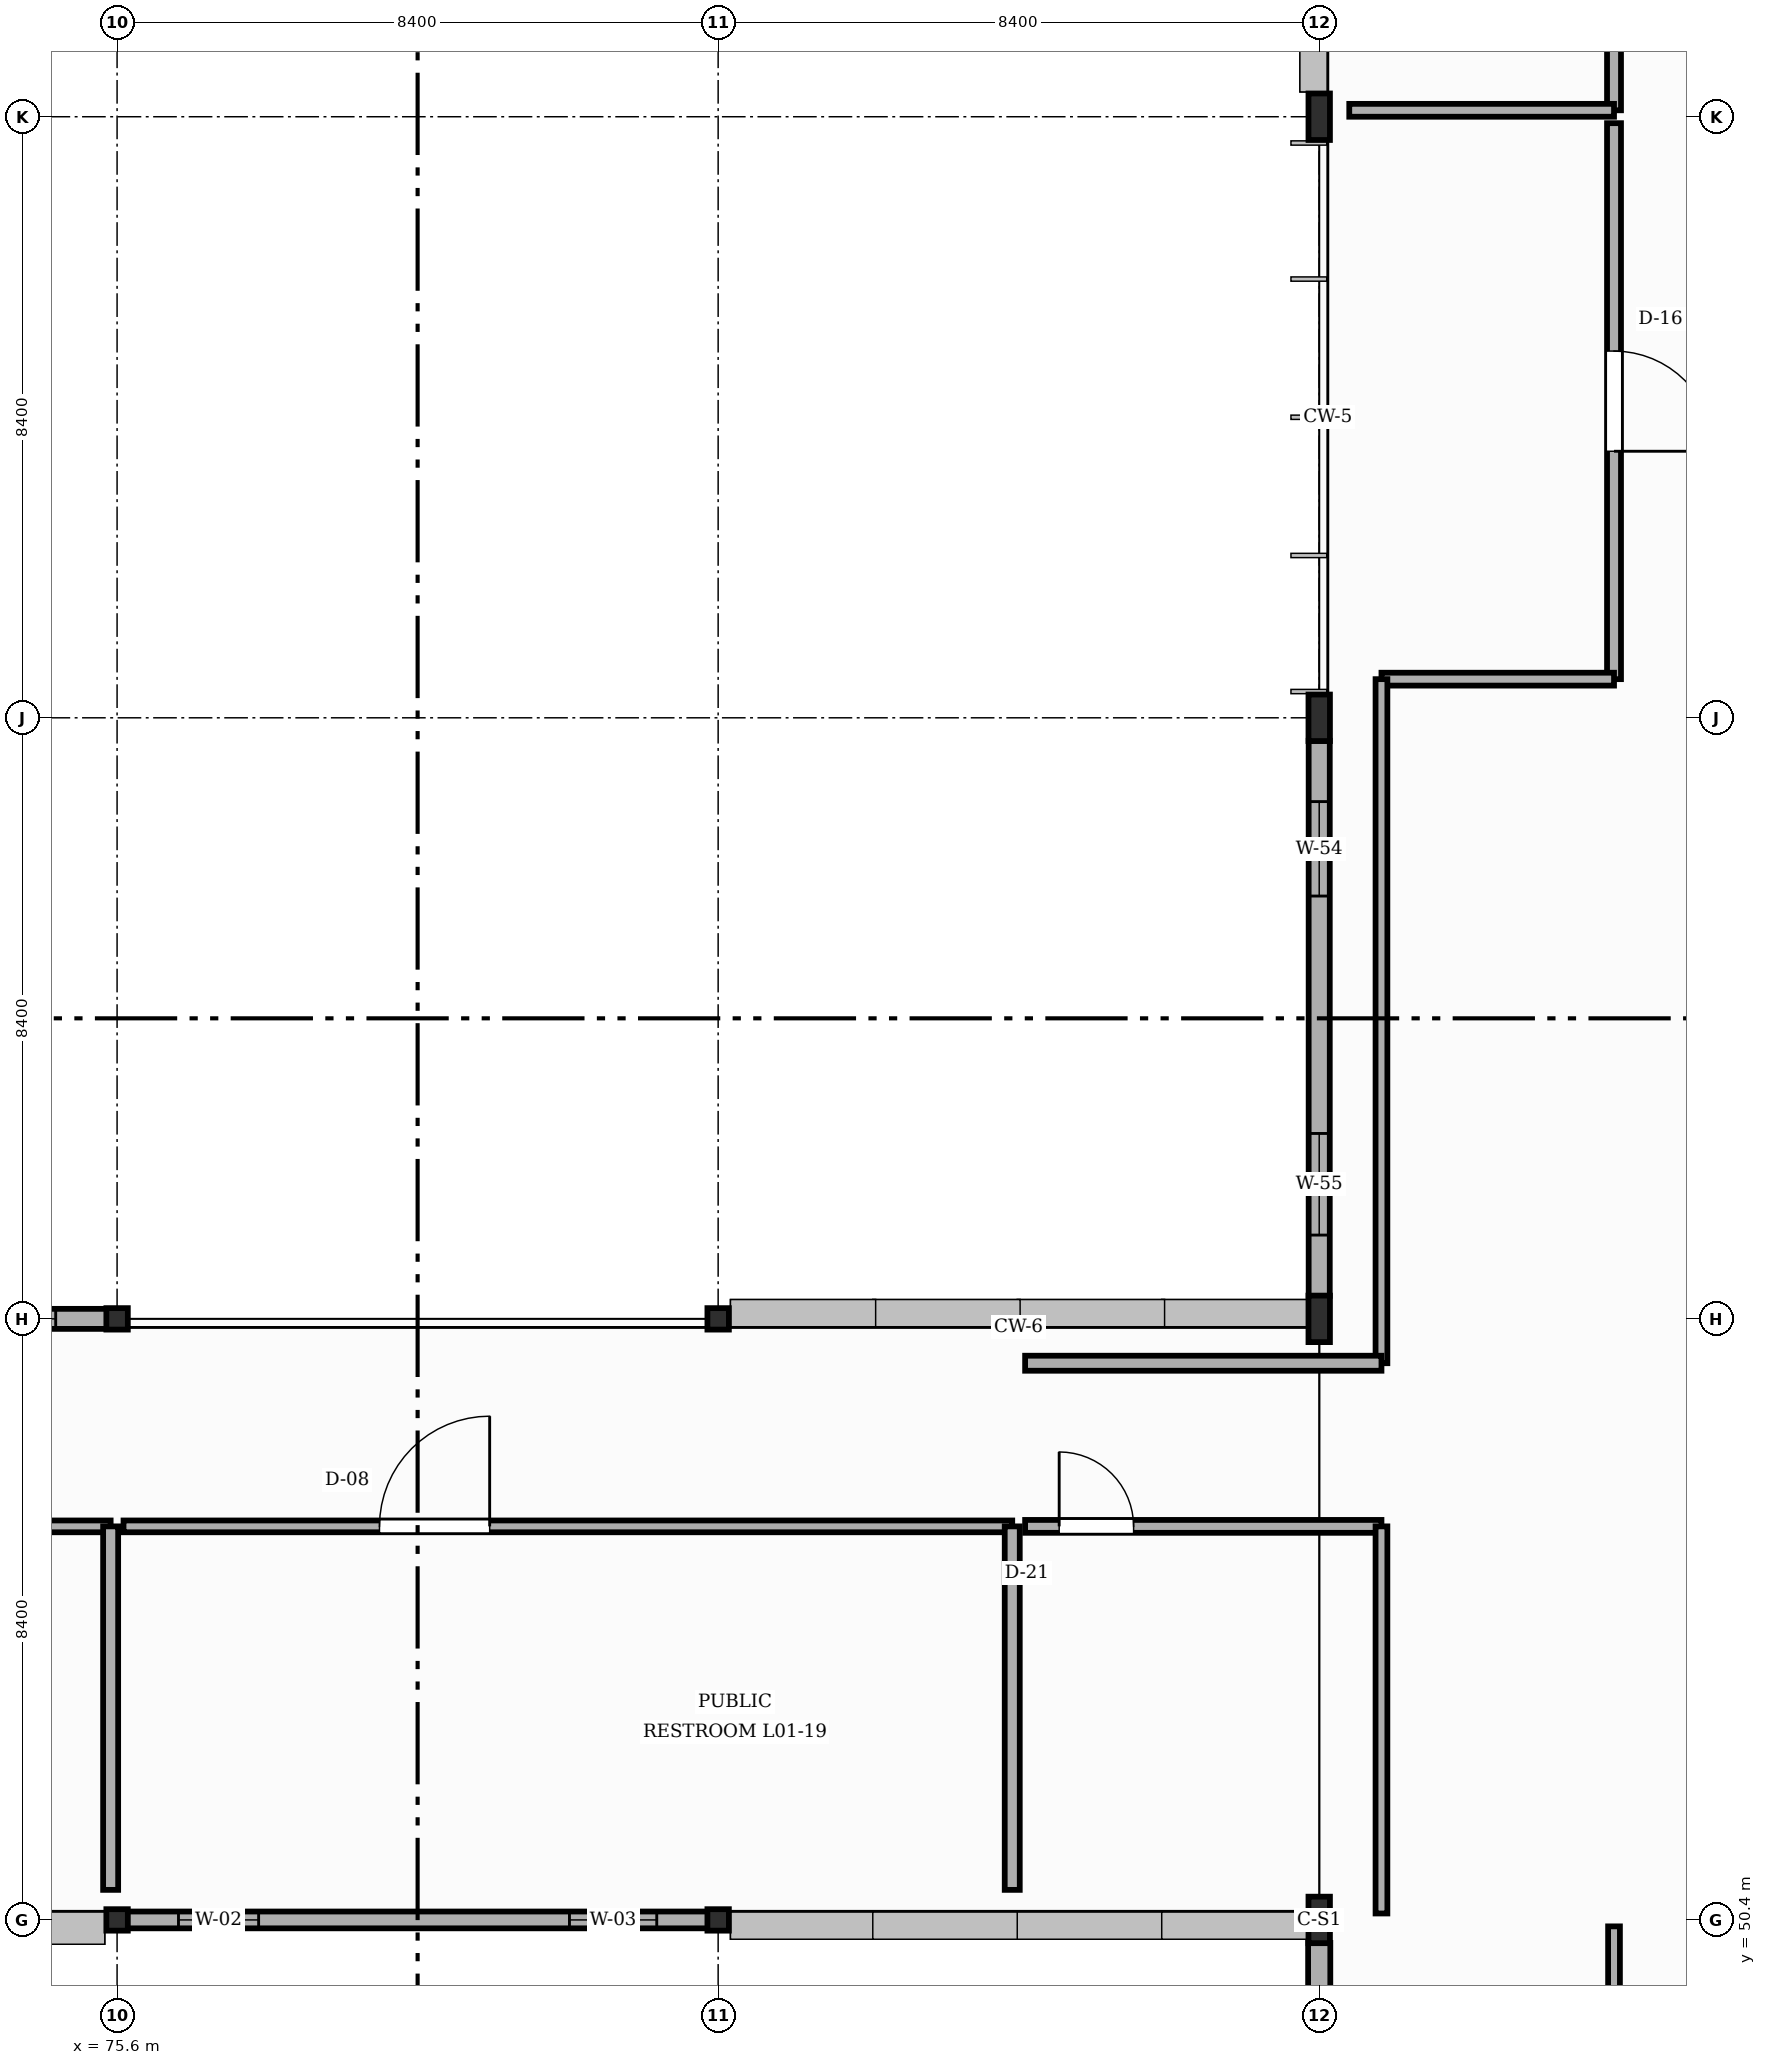
"""IFC4 building model, lengths in metres.
Left out: names, types, materials, properties, quantities, classifications, styles, units other than length and angle.
Written with IfcOpenShell. Run it as: python <this file> out.ifc"""

import sys

from ifc_helpers import new_model, si_unit, direction, frame, frame_2d, origin, origin_2d, place, context, subcontext, project, spatial, rectangle, i_section, extrude, element, fill, save


model = new_model("IFC4")
c1 = context("Model", 3, precision=1e-05, world=origin(), true_north=direction((0.0, 1.0)))
c2 = subcontext(c1, "Body", "Model", "MODEL_VIEW")
j1 = project(units=[si_unit("LENGTHUNIT", "METRE"), si_unit("PLANEANGLEUNIT", "RADIAN")], contexts=[c1])
p1 = place(None, origin())
s1 = spatial("IfcSite", under=j1, at=p1, CompositionType="ELEMENT")
p2 = place(p1, origin())
s2 = spatial("IfcBuilding", under=s1, at=p2, CompositionType="ELEMENT")
p3 = place(p2, frame((0.0, 0.0, 5.4)))
s3 = spatial("IfcBuildingStorey", under=s2, at=p3, CompositionType="ELEMENT", Elevation=5.4)
for number, where, z_axis, x_axis in (
    (1, (75.6, 50.4, 0.0), (0.0, 0.0, 1.0), (1.0, 0.0, 0.0)),
    (2, (75.6, 58.8, 0.0), (0.0, 0.0, 1.0), (1.0, 0.0, 0.0)),
    (3, (84.0, 50.4, 0.0), (0.0, 0.0, 1.0), (1.0, 0.0, 0.0)),
    (4, (84.0, 58.8, 0.0), (0.0, 0.0, 1.0), (1.0, 0.0, 0.0)),
):
    element("IfcColumn", number, at=place(p3, frame(where, z_axis=z_axis, x_axis=x_axis)), inside=s3, PredefinedType="COLUMN", context=c2, shape_type="SweptSolid", body=[
        extrude(i_section(OverallWidth=0.3, OverallDepth=0.3, WebThickness=0.011, FlangeThickness=0.019, FilletRadius=0.027, at=origin_2d()), origin(), (0.0, 0.0, 1.0), 4.5),
    ])
for number, where, z_axis, x_axis in (
    (5, (92.4, 50.4, 0.0), (0.0, 0.0, 1.0), (1.0, 0.0, 0.0)),
    (6, (92.4, 58.8, 0.0), (0.0, 0.0, 1.0), (1.0, 0.0, 0.0)),
    (7, (92.4, 67.2, 0.0), (0.0, 0.0, 1.0), (1.0, 0.0, 0.0)),
    (8, (92.4, 75.6, 0.0), (0.0, 0.0, 1.0), (1.0, 0.0, 0.0)),
):
    element("IfcColumn", number, at=place(p3, frame(where, z_axis=z_axis, x_axis=x_axis)), inside=s3, PredefinedType="COLUMN", context=c2, shape_type="SweptSolid", body=[
        extrude(i_section(OverallWidth=0.3, OverallDepth=0.65, WebThickness=0.016, FlangeThickness=0.031, FilletRadius=0.027, at=origin_2d()), origin(), (0.0, 0.0, 1.0), 4.5),
    ])
p4 = place(p3, frame((92.4, 66.879, 0.0), z_axis=(0.0, 0.0, 1.0), x_axis=(0.0, -1.0, 0.0)))
e9 = element("IfcWall", 9, at=p4, inside=s3, PredefinedType="STANDARD", context=c2, shape_type="SweptSolid", body=[
    extrude(rectangle(XDim=7.758, YDim=0.295, at=frame_2d((3.879, 0.0))), origin(), (0.0, 0.0, 1.0), 3.922),
])
p5 = place(p4, frame((0.85, 0.0, 0.9)))
e10 = element("IfcOpeningElement", 10, at=p5, cuts=e9, PredefinedType="OPENING", context=c2, shape_type="SweptSolid", body=[
    extrude(rectangle(XDim=1.32, YDim=2.05, at=frame_2d((0.66, 1.025))), frame((0.0, 0.157, 0.0), z_axis=(0.0, -1.0, 0.0), x_axis=(1.0, 0.0, 0.0)), (0.0, 0.0, 1.0), 0.315),
])
p6 = place(p4, frame((5.488, 0.0, 0.9)))
e11 = element("IfcOpeningElement", 11, at=p6, cuts=e9, PredefinedType="OPENING", context=c2, shape_type="SweptSolid", body=[
    extrude(rectangle(XDim=1.42, YDim=2.05, at=frame_2d((0.71, 1.025))), frame((0.0, 0.157, 0.0), z_axis=(0.0, -1.0, 0.0), x_axis=(1.0, 0.0, 0.0)), (0.0, 0.0, 1.0), 0.315),
])
p7 = place(p3, frame((75.592, 58.8, 0.0), z_axis=(0.0, 0.0, 1.0), x_axis=(-1.0, 0.0, 0.0)))
e12 = element("IfcWall", 12, at=p7, inside=s3, PredefinedType="STANDARD", context=c2, shape_type="SweptSolid", body=[
    extrude(rectangle(XDim=8.384, YDim=0.28, at=frame_2d((4.192, 0.0))), origin(), (0.0, 0.0, 1.0), 3.952),
])
p8 = place(p7, frame((0.85, 0.0, 0.9)))
e13 = element("IfcOpeningElement", 13, at=p8, cuts=e12, PredefinedType="OPENING", context=c2, shape_type="SweptSolid", body=[
    extrude(rectangle(XDim=1.52, YDim=2.05, at=frame_2d((0.76, 1.025))), frame((0.0, 0.15, 0.0), z_axis=(0.0, -1.0, 0.0), x_axis=(1.0, 0.0, 0.0)), (0.0, 0.0, 1.0), 0.3),
])
p9 = place(p7, frame((5.914, 0.0, 0.9)))
e14 = element("IfcOpeningElement", 14, at=p9, cuts=e12, PredefinedType="OPENING", context=c2, shape_type="SweptSolid", body=[
    extrude(rectangle(XDim=1.62, YDim=2.05, at=frame_2d((0.81, 1.025))), frame((0.0, 0.15, 0.0), z_axis=(0.0, -1.0, 0.0), x_axis=(1.0, 0.0, 0.0)), (0.0, 0.0, 1.0), 0.3),
])
p10 = place(p3, frame((75.608, 50.4, 0.0), z_axis=(0.0, 0.0, 1.0), x_axis=(1.0, 0.0, 0.0)))
e15 = element("IfcWall", 15, at=p10, inside=s3, PredefinedType="STANDARD", context=c2, shape_type="SweptSolid", body=[
    extrude(rectangle(XDim=8.384, YDim=0.235, at=frame_2d((4.192, 0.0))), origin(), (0.0, 0.0, 1.0), 3.952),
])
p11 = place(p10, frame((0.85, 0.0, 0.9)))
e16 = element("IfcOpeningElement", 16, at=p11, cuts=e15, PredefinedType="OPENING", context=c2, shape_type="SweptSolid", body=[
    extrude(rectangle(XDim=1.12, YDim=1.05, at=frame_2d((0.56, 0.525))), frame((0.0, 0.127, 0.0), z_axis=(0.0, -1.0, 0.0), x_axis=(1.0, 0.0, 0.0)), (0.0, 0.0, 1.0), 0.255),
])
p12 = place(p10, frame((6.314, 0.0, 0.9)))
e17 = element("IfcOpeningElement", 17, at=p12, cuts=e15, PredefinedType="OPENING", context=c2, shape_type="SweptSolid", body=[
    extrude(rectangle(XDim=1.22, YDim=1.05, at=frame_2d((0.61, 0.525))), frame((0.0, 0.127, 0.0), z_axis=(0.0, -1.0, 0.0), x_axis=(1.0, 0.0, 0.0)), (0.0, 0.0, 1.0), 0.255),
])
p13 = place(p3, frame((92.4, 50.079, 0.0), z_axis=(0.0, 0.0, 1.0), x_axis=(0.0, -1.0, 0.0)))
e18 = element("IfcWall", 18, at=p13, inside=s3, PredefinedType="STANDARD", context=c2, shape_type="SweptSolid", body=[
    extrude(rectangle(XDim=7.758, YDim=0.31, at=frame_2d((3.879, 0.0))), origin(), (0.0, 0.0, 1.0), 3.922),
])
p14 = place(p3, frame((96.52, 77.68, -0.004), z_axis=(0.0, 0.0, 1.0), x_axis=(0.0, -1.0, 0.0)))
e19 = element("IfcWall", 19, at=p14, inside=s3, PredefinedType="STANDARD", context=c2, shape_type="SweptSolid", body=[
    extrude(rectangle(XDim=1.99, YDim=0.195, at=frame_2d((0.995, 0.0))), origin(), (0.0, 0.0, 1.0), 4.294),
])
p15 = place(p3, frame((96.52, 75.69, -0.004), z_axis=(0.0, 0.0, 1.0), x_axis=(-1.0, 0.0, 0.0)))
e20 = element("IfcWall", 20, at=p15, inside=s3, PredefinedType="STANDARD", context=c2, shape_type="SweptSolid", body=[
    extrude(rectangle(XDim=3.7, YDim=0.18, at=frame_2d((1.85, 0.0))), origin(), (0.0, 0.0, 1.0), 3.286),
])
p16 = place(p3, frame((63.09, 55.9, -0.004), z_axis=(0.0, 0.0, 1.0), x_axis=(1.0, 0.0, 0.0)))
e21 = element("IfcWall", 21, at=p16, inside=s3, PredefinedType="STANDARD", context=c2, shape_type="SweptSolid", body=[
    extrude(rectangle(XDim=12.42, YDim=0.165, at=frame_2d((6.21, 0.0))), origin(), (0.0, 0.0, 1.0), 4.294),
])
p17 = place(p16, frame((7.433, 0.0, 0.0)))
e22 = element("IfcOpeningElement", 22, at=p17, cuts=e21, PredefinedType="OPENING", context=c2, shape_type="SweptSolid", body=[
    extrude(rectangle(XDim=1.28, YDim=2.06, at=frame_2d((0.64, 1.03))), frame((0.0, 0.093, 0.0), z_axis=(0.0, -1.0, 0.0), x_axis=(1.0, 0.0, 0.0)), (0.0, 0.0, 1.0), 0.185),
])
p18 = place(p3, frame((75.51, 55.9, -0.004), z_axis=(0.0, 0.0, 1.0), x_axis=(0.0, -1.0, 0.0)))
e23 = element("IfcWall", 23, at=p18, inside=s3, PredefinedType="STANDARD", context=c2, shape_type="SweptSolid", body=[
    extrude(rectangle(XDim=5.08, YDim=0.21, at=frame_2d((2.54, 0.0))), origin(), (0.0, 0.0, 1.0), 4.016),
])
p19 = place(p3, frame((75.69, 55.9, -0.004), z_axis=(0.0, 0.0, 1.0), x_axis=(1.0, 0.0, 0.0)))
e24 = element("IfcWall", 24, at=p19, inside=s3, PredefinedType="STANDARD", context=c2, shape_type="SweptSolid", body=[
    extrude(rectangle(XDim=12.42, YDim=0.165, at=frame_2d((6.21, 0.0))), origin(), (0.0, 0.0, 1.0), 4.294),
])
p20 = place(p19, frame((3.577, 0.0, 0.0)))
e25 = element("IfcOpeningElement", 25, at=p20, cuts=e24, PredefinedType="OPENING", context=c2, shape_type="SweptSolid", body=[
    extrude(rectangle(XDim=1.54, YDim=2.06, at=frame_2d((0.77, 1.03))), frame((0.0, 0.093, 0.0), z_axis=(0.0, -1.0, 0.0), x_axis=(1.0, 0.0, 0.0)), (0.0, 0.0, 1.0), 0.185),
])
p21 = place(p3, frame((88.11, 55.9, -0.004), z_axis=(0.0, 0.0, 1.0), x_axis=(0.0, -1.0, 0.0)))
e26 = element("IfcWall", 26, at=p21, inside=s3, PredefinedType="STANDARD", context=c2, shape_type="SweptSolid", body=[
    extrude(rectangle(XDim=5.08, YDim=0.21, at=frame_2d((2.54, 0.0))), origin(), (0.0, 0.0, 1.0), 4.294),
])
p22 = place(p3, frame((96.52, 75.51, -0.004), z_axis=(0.0, 0.0, 1.0), x_axis=(0.0, -1.0, 0.0)))
e27 = element("IfcWall", 27, at=p22, inside=s3, PredefinedType="STANDARD", context=c2, shape_type="SweptSolid", body=[
    extrude(rectangle(XDim=7.77, YDim=0.195, at=frame_2d((3.885, 0.0))), origin(), (0.0, 0.0, 1.0), 4.294),
])
p23 = place(p22, frame((3.185, 0.0, 0.0)))
e28 = element("IfcOpeningElement", 28, at=p23, cuts=e27, PredefinedType="OPENING", context=c2, shape_type="SweptSolid", body=[
    extrude(rectangle(XDim=1.4, YDim=2.14, at=frame_2d((0.7, 1.07))), frame((0.0, 0.107, 0.0), z_axis=(0.0, -1.0, 0.0), x_axis=(1.0, 0.0, 0.0)), (0.0, 0.0, 1.0), 0.215),
])
p24 = place(p3, frame((96.52, 67.74, -0.004), z_axis=(0.0, 0.0, 1.0), x_axis=(-1.0, 0.0, 0.0)))
e29 = element("IfcWall", 29, at=p24, inside=s3, PredefinedType="STANDARD", context=c2, shape_type="SweptSolid", body=[
    extrude(rectangle(XDim=3.25, YDim=0.18, at=frame_2d((1.625, 0.0))), origin(), (0.0, 0.0, 1.0), 3.286),
])
p25 = place(p3, frame((93.27, 67.74, -0.004), z_axis=(0.0, 0.0, 1.0), x_axis=(0.0, -1.0, 0.0)))
e30 = element("IfcWall", 30, at=p25, inside=s3, PredefinedType="STANDARD", context=c2, shape_type="SweptSolid", body=[
    extrude(rectangle(XDim=9.56, YDim=0.165, at=frame_2d((4.78, 0.0))), origin(), (0.0, 0.0, 1.0), 4.294),
])
p26 = place(p3, frame((93.27, 58.18, -0.004), z_axis=(0.0, 0.0, 1.0), x_axis=(-1.0, 0.0, 0.0)))
e31 = element("IfcWall", 31, at=p26, inside=s3, PredefinedType="STANDARD", context=c2, shape_type="SweptSolid", body=[
    extrude(rectangle(XDim=4.98, YDim=0.21, at=frame_2d((2.49, 0.0))), origin(), (0.0, 0.0, 1.0), 4.294),
])
p27 = place(p3, frame((96.52, 50.31, -0.004), z_axis=(0.0, 0.0, 1.0), x_axis=(0.0, -1.0, 0.0)))
e32 = element("IfcWall", 32, at=p27, inside=s3, PredefinedType="STANDARD", context=c2, shape_type="SweptSolid", body=[
    extrude(rectangle(XDim=2.09, YDim=0.165, at=frame_2d((1.045, 0.0))), origin(), (0.0, 0.0, 1.0), 4.294),
])
p28 = place(p3, frame((88.29, 55.9, -0.004), z_axis=(0.0, 0.0, 1.0), x_axis=(1.0, 0.0, 0.0)))
e33 = element("IfcWall", 33, at=p28, inside=s3, PredefinedType="STANDARD", context=c2, shape_type="SweptSolid", body=[
    extrude(rectangle(XDim=4.98, YDim=0.18, at=frame_2d((2.49, 0.0))), origin(), (0.0, 0.0, 1.0), 4.294),
])
p29 = place(p28, frame((0.476, 0.0, 0.0)))
e34 = element("IfcOpeningElement", 34, at=p29, cuts=e33, PredefinedType="OPENING", context=c2, shape_type="SweptSolid", body=[
    extrude(rectangle(XDim=1.04, YDim=2.22, at=frame_2d((0.52, 1.11))), frame((0.0, 0.1, 0.0), z_axis=(0.0, -1.0, 0.0), x_axis=(1.0, 0.0, 0.0)), (0.0, 0.0, 1.0), 0.2),
])
p30 = place(p3, frame((93.27, 55.9, -0.004), z_axis=(0.0, 0.0, 1.0), x_axis=(0.0, -1.0, 0.0)))
e35 = element("IfcWall", 35, at=p30, inside=s3, PredefinedType="STANDARD", context=c2, shape_type="SweptSolid", body=[
    extrude(rectangle(XDim=5.41, YDim=0.165, at=frame_2d((2.705, 0.0))), origin(), (0.0, 0.0, 1.0), 4.294),
])
p31 = place(p5, origin())
e36 = element("IfcWindow", 36, at=p31, inside=s3, PartitioningType="SINGLE_PANEL", PredefinedType="WINDOW", context=c2, shape_type="SweptSolid", body=[
    extrude(rectangle(XDim=1.32, YDim=2.05, at=frame_2d((0.66, 1.025))), frame((0.0, 0.03, 0.0), z_axis=(0.0, -1.0, 0.0), x_axis=(1.0, 0.0, 0.0)), (0.0, 0.0, 1.0), 0.06),
])
fill(e10, e36)
p32 = place(p6, origin())
e37 = element("IfcWindow", 37, at=p32, inside=s3, PartitioningType="SINGLE_PANEL", PredefinedType="WINDOW", context=c2, shape_type="SweptSolid", body=[
    extrude(rectangle(XDim=1.42, YDim=2.05, at=frame_2d((0.71, 1.025))), frame((0.0, 0.03, 0.0), z_axis=(0.0, -1.0, 0.0), x_axis=(1.0, 0.0, 0.0)), (0.0, 0.0, 1.0), 0.06),
])
fill(e11, e37)
p33 = place(p8, origin())
e38 = element("IfcWindow", 38, at=p33, inside=s3, PartitioningType="SINGLE_PANEL", PredefinedType="WINDOW", context=c2, shape_type="SweptSolid", body=[
    extrude(rectangle(XDim=1.52, YDim=2.05, at=frame_2d((0.76, 1.025))), frame((0.0, 0.03, 0.0), z_axis=(0.0, -1.0, 0.0), x_axis=(1.0, 0.0, 0.0)), (0.0, 0.0, 1.0), 0.06),
])
fill(e13, e38)
p34 = place(p11, origin())
e39 = element("IfcWindow", 39, at=p34, inside=s3, PartitioningType="SINGLE_PANEL", PredefinedType="WINDOW", context=c2, shape_type="SweptSolid", body=[
    extrude(rectangle(XDim=1.12, YDim=1.05, at=frame_2d((0.56, 0.525))), frame((0.0, 0.03, 0.0), z_axis=(0.0, -1.0, 0.0), x_axis=(1.0, 0.0, 0.0)), (0.0, 0.0, 1.0), 0.06),
])
fill(e16, e39)
p35 = place(p12, origin())
e40 = element("IfcWindow", 40, at=p35, inside=s3, PartitioningType="SINGLE_PANEL", PredefinedType="WINDOW", context=c2, shape_type="SweptSolid", body=[
    extrude(rectangle(XDim=1.22, YDim=1.05, at=frame_2d((0.61, 0.525))), frame((0.0, 0.03, 0.0), z_axis=(0.0, -1.0, 0.0), x_axis=(1.0, 0.0, 0.0)), (0.0, 0.0, 1.0), 0.06),
])
fill(e17, e40)
p36 = place(p20, origin())
e41 = element("IfcDoor", 41, at=p36, inside=s3, OperationType="SINGLE_SWING_RIGHT", PredefinedType="DOOR", context=c2, shape_type="SweptSolid", body=[
    extrude(rectangle(XDim=1.54, YDim=2.06, at=frame_2d((0.77, 1.03))), frame((0.0, 0.025, 0.0), z_axis=(0.0, -1.0, 0.0), x_axis=(1.0, 0.0, 0.0)), (0.0, 0.0, 1.0), 0.05),
])
fill(e25, e41)
p37 = place(p23, origin())
e42 = element("IfcDoor", 42, at=p37, inside=s3, OperationType="SINGLE_SWING_RIGHT", PredefinedType="DOOR", context=c2, shape_type="SweptSolid", body=[
    extrude(rectangle(XDim=1.4, YDim=2.14, at=frame_2d((0.7, 1.07))), frame((0.0, 0.025, 0.0), z_axis=(0.0, -1.0, 0.0), x_axis=(1.0, 0.0, 0.0)), (0.0, 0.0, 1.0), 0.05),
])
fill(e28, e42)
p38 = place(p29, origin())
e43 = element("IfcDoor", 43, at=p38, inside=s3, OperationType="SINGLE_SWING_LEFT", PredefinedType="DOOR", context=c2, shape_type="SweptSolid", body=[
    extrude(rectangle(XDim=1.04, YDim=2.22, at=frame_2d((0.52, 1.11))), frame((0.0, 0.025, 0.0), z_axis=(0.0, -1.0, 0.0), x_axis=(1.0, 0.0, 0.0)), (0.0, 0.0, 1.0), 0.05),
])
fill(e34, e43)
save(model, sys.argv[1])
